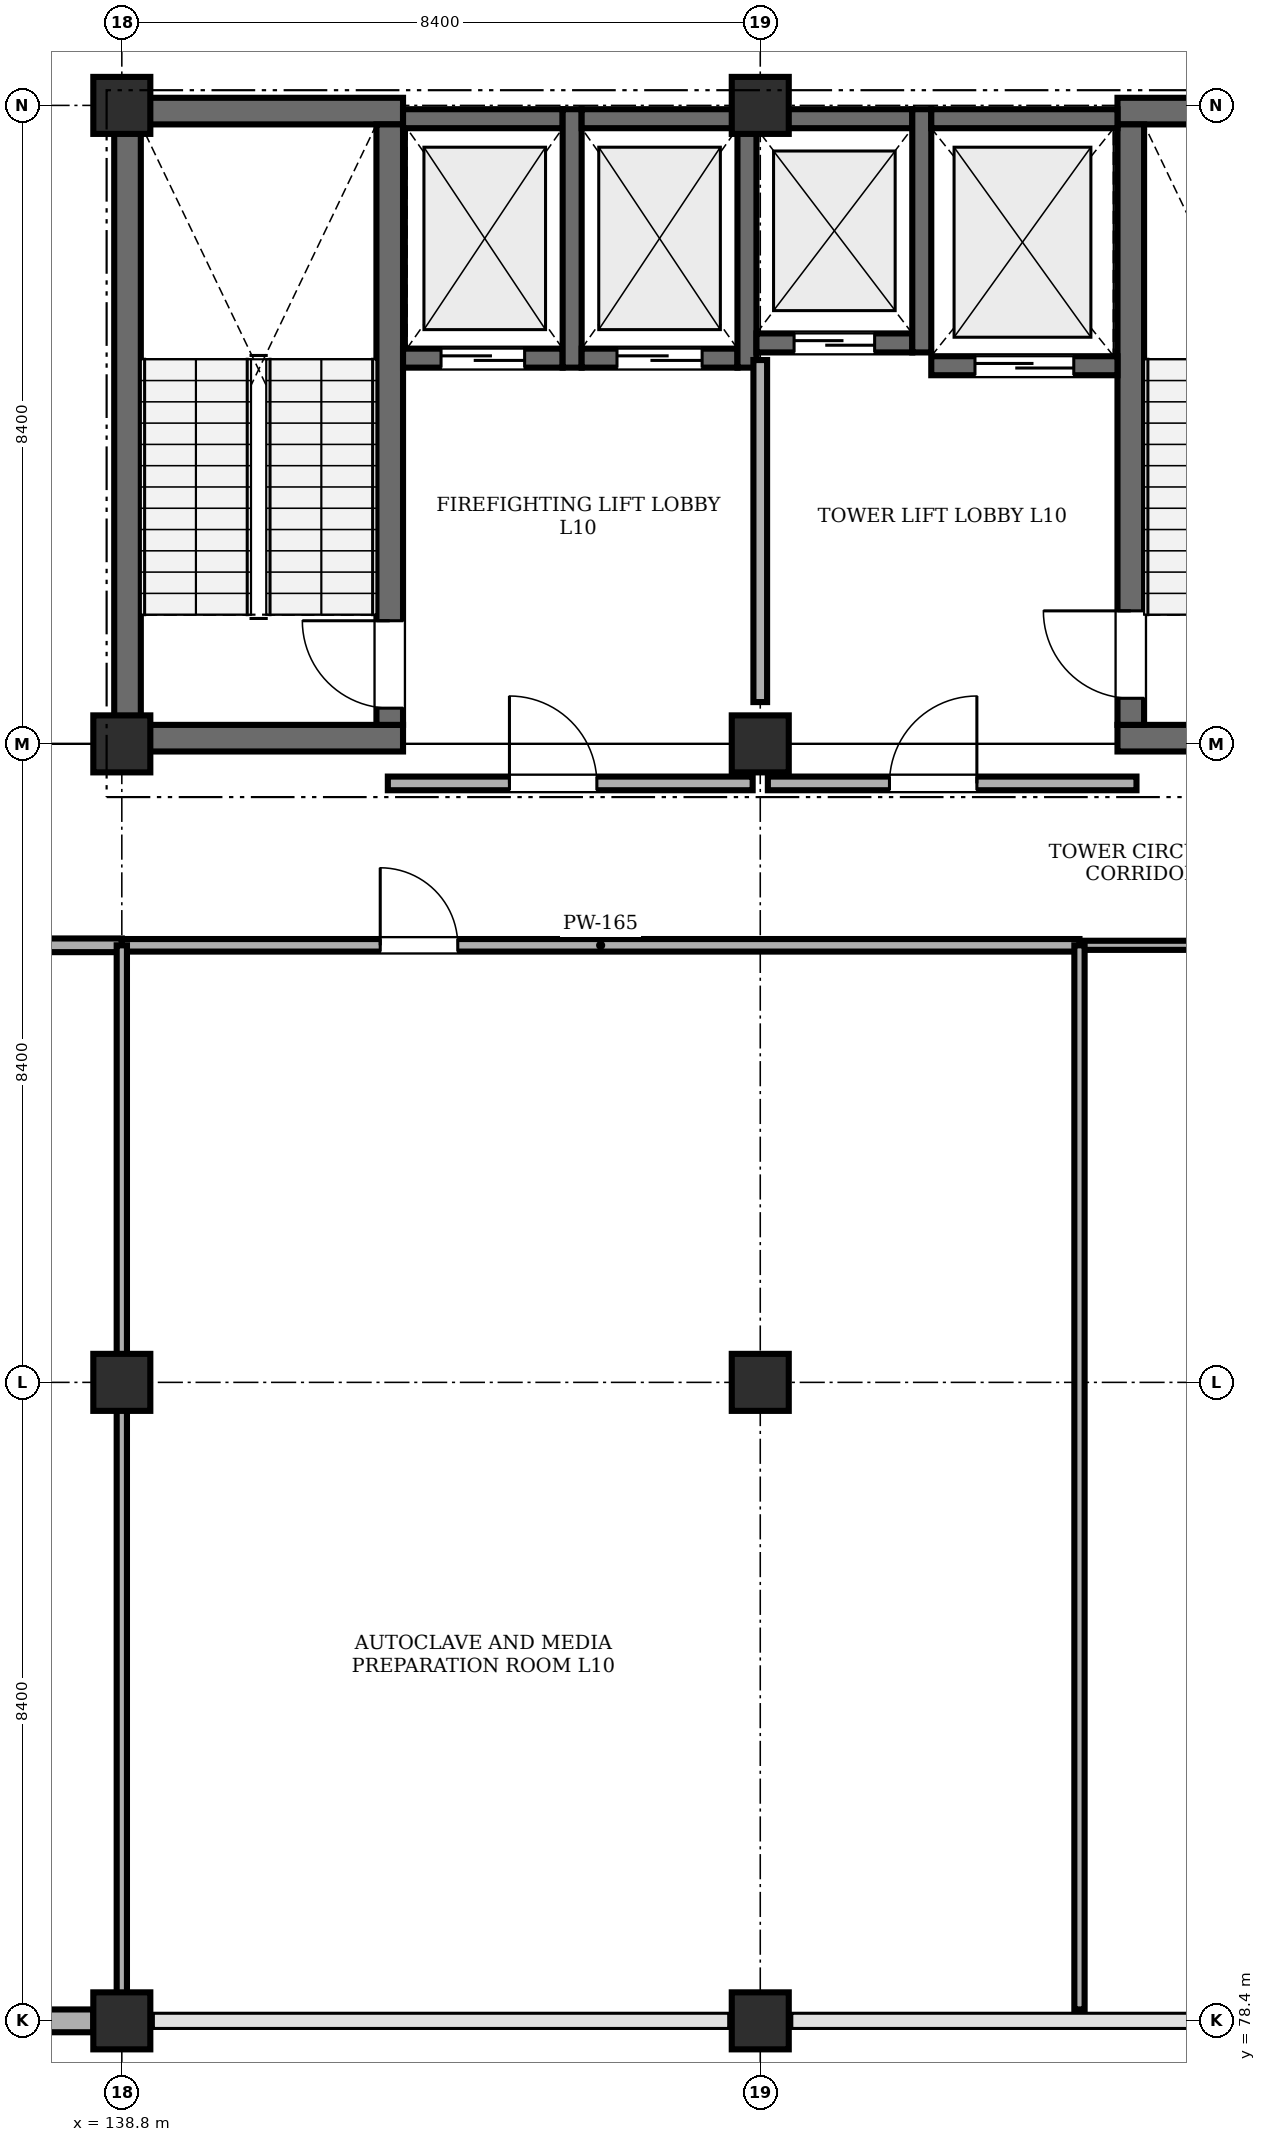
"""IFC4 building model, lengths in metres.
Left out: names, types, materials, properties, quantities, classifications, styles, units other than length and angle.
Written with IfcOpenShell. Run it as: python <this file> out.ifc"""

import sys

from ifc_helpers import new_model, si_unit, direction, frame, frame_2d, origin, origin_2d, place, context, subcontext, project, spatial, rectangle, extrude, element, fill, save


model = new_model("IFC4")
c1 = context("Model", 3, precision=1e-05, world=origin(), true_north=direction((0.0, 1.0)))
c2 = subcontext(c1, "Body", "Model", "MODEL_VIEW")
j1 = project(units=[si_unit("LENGTHUNIT", "METRE"), si_unit("PLANEANGLEUNIT", "RADIAN")], contexts=[c1])
p1 = place(None, origin())
s1 = spatial("IfcSite", under=j1, at=p1, CompositionType="ELEMENT")
p2 = place(p1, origin())
s2 = spatial("IfcBuilding", under=s1, at=p2, CompositionType="ELEMENT")
p3 = place(p2, frame((0.0, 0.0, 40.2)))
s3 = spatial("IfcBuildingStorey", under=s2, at=p3, CompositionType="ELEMENT", Elevation=40.2)
for number, where, z_axis, x_axis in (
    (1, (138.8, 78.4, 0.0), (0.0, 0.0, 1.0), (1.0, 0.0, 0.0)),
    (2, (138.8, 86.8, 0.0), (0.0, 0.0, 1.0), (1.0, 0.0, 0.0)),
    (3, (138.8, 95.2, 0.0), (0.0, 0.0, 1.0), (1.0, 0.0, 0.0)),
    (4, (138.8, 103.6, 0.0), (0.0, 0.0, 1.0), (1.0, 0.0, 0.0)),
    (5, (147.2, 78.4, 0.0), (0.0, 0.0, 1.0), (1.0, 0.0, 0.0)),
    (6, (147.2, 86.8, 0.0), (0.0, 0.0, 1.0), (1.0, 0.0, 0.0)),
    (7, (147.2, 95.2, 0.0), (0.0, 0.0, 1.0), (1.0, 0.0, 0.0)),
    (8, (147.2, 103.6, 0.0), (0.0, 0.0, 1.0), (1.0, 0.0, 0.0)),
):
    element("IfcColumn", number, at=place(p3, frame(where, z_axis=z_axis, x_axis=x_axis)), inside=s3, PredefinedType="COLUMN", context=c2, shape_type="SweptSolid", body=[
        extrude(rectangle(XDim=0.75, YDim=0.75, at=origin_2d()), origin(), (0.0, 0.0, 1.0), 4.0),
    ])
for number, where, z_axis, x_axis in (
    (9, (138.7, 95.275, 0.0), (0.0, 0.0, 1.0), (1.0, 0.0, 0.0)),
    (10, (138.7, 103.525, 0.0), (0.0, 0.0, 1.0), (1.0, 0.0, 0.0)),
):
    element("IfcWall", number, at=place(p3, frame(where, z_axis=z_axis, x_axis=x_axis)), inside=s3, PredefinedType="SHEAR", context=c2, shape_type="SweptSolid", body=[
        extrude(rectangle(XDim=3.8, YDim=0.35, at=frame_2d((1.9, 0.0))), origin(), (0.0, 0.0, 1.0), 4.0),
    ])
p4 = place(p3, frame((138.875, 95.45, 0.0), z_axis=(0.0, 0.0, 1.0), x_axis=(0.0, 1.0, 0.0)))
e11 = element("IfcWall", 11, at=p4, inside=s3, PredefinedType="SHEAR", context=c2, shape_type="SweptSolid", body=[
    extrude(rectangle(XDim=7.9, YDim=0.35, at=frame_2d((3.95, 0.0))), origin(), (0.0, 0.0, 1.0), 4.0),
])
p5 = place(p3, frame((142.325, 95.45, 0.0), z_axis=(0.0, 0.0, 1.0), x_axis=(0.0, 1.0, 0.0)))
e12 = element("IfcWall", 12, at=p5, inside=s3, PredefinedType="SHEAR", context=c2, shape_type="SweptSolid", body=[
    extrude(rectangle(XDim=7.9, YDim=0.35, at=frame_2d((3.95, 0.0))), origin(), (0.0, 0.0, 1.0), 4.0),
])
p6 = place(p5, frame((0.22, 0.0, 0.0)))
e13 = element("IfcOpeningElement", 13, at=p6, cuts=e12, PredefinedType="OPENING", context=c2, shape_type="SweptSolid", body=[
    extrude(rectangle(XDim=1.15, YDim=2.15, at=frame_2d((0.575, 1.075))), frame((0.0, 0.185, 0.0), z_axis=(0.0, -1.0, 0.0), x_axis=(1.0, 0.0, 0.0)), (0.0, 0.0, 1.0), 0.37),
])
for number, where, z_axis, x_axis in (
    (14, (151.9, 95.275, 0.0), (0.0, 0.0, 1.0), (1.0, 0.0, 0.0)),
    (15, (151.9, 103.525, 0.0), (0.0, 0.0, 1.0), (1.0, 0.0, 0.0)),
):
    element("IfcWall", number, at=place(p3, frame(where, z_axis=z_axis, x_axis=x_axis)), inside=s3, PredefinedType="SHEAR", context=c2, shape_type="SweptSolid", body=[
        extrude(rectangle(XDim=3.8, YDim=0.35, at=frame_2d((1.9, 0.0))), origin(), (0.0, 0.0, 1.0), 4.0),
    ])
p7 = place(p3, frame((152.075, 95.45, 0.0), z_axis=(0.0, 0.0, 1.0), x_axis=(0.0, 1.0, 0.0)))
e16 = element("IfcWall", 16, at=p7, inside=s3, PredefinedType="SHEAR", context=c2, shape_type="SweptSolid", body=[
    extrude(rectangle(XDim=7.9, YDim=0.35, at=frame_2d((3.95, 0.0))), origin(), (0.0, 0.0, 1.0), 4.0),
])
p8 = place(p7, frame((0.35, 0.0, 0.0)))
e17 = element("IfcOpeningElement", 17, at=p8, cuts=e16, PredefinedType="OPENING", context=c2, shape_type="SweptSolid", body=[
    extrude(rectangle(XDim=1.15, YDim=2.15, at=frame_2d((0.575, 1.075))), frame((0.0, 0.185, 0.0), z_axis=(0.0, -1.0, 0.0), x_axis=(1.0, 0.0, 0.0)), (0.0, 0.0, 1.0), 0.37),
])
p9 = place(p3, frame((142.5, 100.275, 0.0), z_axis=(0.0, 0.0, 1.0), x_axis=(1.0, 0.0, 0.0)))
e18 = element("IfcWall", 18, at=p9, inside=s3, PredefinedType="SHEAR", context=c2, shape_type="SweptSolid", body=[
    extrude(rectangle(XDim=2.1, YDim=0.25, at=frame_2d((1.05, 0.0))), origin(), (0.0, 0.0, 1.0), 4.0),
])
p10 = place(p9, frame((0.5, 0.0, 0.0)))
e19 = element("IfcOpeningElement", 19, at=p10, cuts=e18, PredefinedType="OPENING", context=c2, shape_type="SweptSolid", body=[
    extrude(rectangle(XDim=1.1, YDim=2.15, at=frame_2d((0.55, 1.075))), frame((0.0, 0.135, 0.0), z_axis=(0.0, -1.0, 0.0), x_axis=(1.0, 0.0, 0.0)), (0.0, 0.0, 1.0), 0.27),
])
p11 = place(p3, frame((142.5, 103.425, 0.0), z_axis=(0.0, 0.0, 1.0), x_axis=(1.0, 0.0, 0.0)))
e20 = element("IfcWall", 20, at=p11, inside=s3, PredefinedType="SHEAR", context=c2, shape_type="SweptSolid", body=[
    extrude(rectangle(XDim=2.1, YDim=0.25, at=frame_2d((1.05, 0.0))), origin(), (0.0, 0.0, 1.0), 4.0),
])
p12 = place(p3, frame((144.725, 100.15, 0.0), z_axis=(0.0, 0.0, 1.0), x_axis=(0.0, 1.0, 0.0)))
e21 = element("IfcWall", 21, at=p12, inside=s3, PredefinedType="SHEAR", context=c2, shape_type="SweptSolid", body=[
    extrude(rectangle(XDim=3.4, YDim=0.25, at=frame_2d((1.7, 0.0))), origin(), (0.0, 0.0, 1.0), 4.0),
])
p13 = place(p3, frame((144.85, 100.275, 0.0), z_axis=(0.0, 0.0, 1.0), x_axis=(1.0, 0.0, 0.0)))
e22 = element("IfcWall", 22, at=p13, inside=s3, PredefinedType="SHEAR", context=c2, shape_type="SweptSolid", body=[
    extrude(rectangle(XDim=2.05, YDim=0.25, at=frame_2d((1.025, 0.0))), origin(), (0.0, 0.0, 1.0), 4.0),
])
p14 = place(p13, frame((0.465, 0.0, 0.0)))
e23 = element("IfcOpeningElement", 23, at=p14, cuts=e22, PredefinedType="OPENING", context=c2, shape_type="SweptSolid", body=[
    extrude(rectangle(XDim=1.12, YDim=2.15, at=frame_2d((0.56, 1.075))), frame((0.0, 0.135, 0.0), z_axis=(0.0, -1.0, 0.0), x_axis=(1.0, 0.0, 0.0)), (0.0, 0.0, 1.0), 0.27),
])
p15 = place(p3, frame((144.85, 103.425, 0.0), z_axis=(0.0, 0.0, 1.0), x_axis=(1.0, 0.0, 0.0)))
e24 = element("IfcWall", 24, at=p15, inside=s3, PredefinedType="SHEAR", context=c2, shape_type="SweptSolid", body=[
    extrude(rectangle(XDim=2.05, YDim=0.25, at=frame_2d((1.025, 0.0))), origin(), (0.0, 0.0, 1.0), 4.0),
])
p16 = place(p3, frame((147.025, 100.15, 0.0), z_axis=(0.0, 0.0, 1.0), x_axis=(0.0, 1.0, 0.0)))
e25 = element("IfcWall", 25, at=p16, inside=s3, PredefinedType="SHEAR", context=c2, shape_type="SweptSolid", body=[
    extrude(rectangle(XDim=3.4, YDim=0.25, at=frame_2d((1.7, 0.0))), origin(), (0.0, 0.0, 1.0), 4.0),
])
p17 = place(p3, frame((147.15, 100.475, 0.0), z_axis=(0.0, 0.0, 1.0), x_axis=(1.0, 0.0, 0.0)))
e26 = element("IfcWall", 26, at=p17, inside=s3, PredefinedType="SHEAR", context=c2, shape_type="SweptSolid", body=[
    extrude(rectangle(XDim=2.05, YDim=0.25, at=frame_2d((1.025, 0.0))), origin(), (0.0, 0.0, 1.0), 4.0),
])
p18 = place(p17, frame((0.495, 0.0, 0.0)))
e27 = element("IfcOpeningElement", 27, at=p18, cuts=e26, PredefinedType="OPENING", context=c2, shape_type="SweptSolid", body=[
    extrude(rectangle(XDim=1.06, YDim=2.15, at=frame_2d((0.53, 1.075))), frame((0.0, 0.135, 0.0), z_axis=(0.0, -1.0, 0.0), x_axis=(1.0, 0.0, 0.0)), (0.0, 0.0, 1.0), 0.27),
])
p19 = place(p3, frame((147.15, 103.425, 0.0), z_axis=(0.0, 0.0, 1.0), x_axis=(1.0, 0.0, 0.0)))
e28 = element("IfcWall", 28, at=p19, inside=s3, PredefinedType="SHEAR", context=c2, shape_type="SweptSolid", body=[
    extrude(rectangle(XDim=2.05, YDim=0.25, at=frame_2d((1.025, 0.0))), origin(), (0.0, 0.0, 1.0), 4.0),
])
p20 = place(p3, frame((149.325, 100.35, 0.0), z_axis=(0.0, 0.0, 1.0), x_axis=(0.0, 1.0, 0.0)))
e29 = element("IfcWall", 29, at=p20, inside=s3, PredefinedType="SHEAR", context=c2, shape_type="SweptSolid", body=[
    extrude(rectangle(XDim=3.2, YDim=0.25, at=frame_2d((1.6, 0.0))), origin(), (0.0, 0.0, 1.0), 4.0),
])
p21 = place(p3, frame((149.45, 100.175, 0.0), z_axis=(0.0, 0.0, 1.0), x_axis=(1.0, 0.0, 0.0)))
e30 = element("IfcWall", 30, at=p21, inside=s3, PredefinedType="SHEAR", context=c2, shape_type="SweptSolid", body=[
    extrude(rectangle(XDim=2.45, YDim=0.25, at=frame_2d((1.225, 0.0))), origin(), (0.0, 0.0, 1.0), 4.0),
])
p22 = place(p21, frame((0.575, 0.0, 0.0)))
e31 = element("IfcOpeningElement", 31, at=p22, cuts=e30, PredefinedType="OPENING", context=c2, shape_type="SweptSolid", body=[
    extrude(rectangle(XDim=1.3, YDim=2.25, at=frame_2d((0.65, 1.125))), frame((0.0, 0.135, 0.0), z_axis=(0.0, -1.0, 0.0), x_axis=(1.0, 0.0, 0.0)), (0.0, 0.0, 1.0), 0.27),
])
p23 = place(p3, frame((149.45, 103.425, 0.0), z_axis=(0.0, 0.0, 1.0), x_axis=(1.0, 0.0, 0.0)))
e32 = element("IfcWall", 32, at=p23, inside=s3, PredefinedType="SHEAR", context=c2, shape_type="SweptSolid", body=[
    extrude(rectangle(XDim=2.45, YDim=0.25, at=frame_2d((1.225, 0.0))), origin(), (0.0, 0.0, 1.0), 4.0),
])
p24 = place(p3, frame((138.425, 78.4, 0.0), z_axis=(0.0, 0.0, 1.0), x_axis=(-1.0, 0.0, 0.0)))
e33 = element("IfcWall", 33, at=p24, inside=s3, PredefinedType="STANDARD", context=c2, shape_type="SweptSolid", body=[
    extrude(rectangle(XDim=7.65, YDim=0.3, at=frame_2d((3.825, 0.0))), origin(), (0.0, 0.0, 1.0), 4.0),
])
p25 = place(p24, frame((1.15, 0.0, 0.95)))
e34 = element("IfcOpeningElement", 34, at=p25, cuts=e33, PredefinedType="OPENING", context=c2, shape_type="SweptSolid", body=[
    extrude(rectangle(XDim=2.25, YDim=1.95, at=frame_2d((1.125, 0.975))), frame((0.0, 0.16, 0.0), z_axis=(0.0, -1.0, 0.0), x_axis=(1.0, 0.0, 0.0)), (0.0, 0.0, 1.0), 0.32),
])
p26 = place(p3, frame((142.3, 94.68, 0.0), z_axis=(0.0, 0.0, 1.0), x_axis=(1.0, 0.0, 0.0)))
e35 = element("IfcWall", 35, at=p26, inside=s3, PredefinedType="STANDARD", context=c2, shape_type="SweptSolid", body=[
    extrude(rectangle(XDim=4.8, YDim=0.18, at=frame_2d((2.4, 0.0))), origin(), (0.0, 0.0, 1.0), 4.0),
])
p27 = place(p26, frame((1.6, 0.0, 0.0)))
e36 = element("IfcOpeningElement", 36, at=p27, cuts=e35, PredefinedType="OPENING", context=c2, shape_type="SweptSolid", body=[
    extrude(rectangle(XDim=1.15, YDim=2.15, at=frame_2d((0.575, 1.075))), frame((0.0, 0.1, 0.0), z_axis=(0.0, -1.0, 0.0), x_axis=(1.0, 0.0, 0.0)), (0.0, 0.0, 1.0), 0.2),
])
p28 = place(p3, frame((147.3, 94.68, 0.0), z_axis=(0.0, 0.0, 1.0), x_axis=(1.0, 0.0, 0.0)))
e37 = element("IfcWall", 37, at=p28, inside=s3, PredefinedType="STANDARD", context=c2, shape_type="SweptSolid", body=[
    extrude(rectangle(XDim=4.85, YDim=0.18, at=frame_2d((2.425, 0.0))), origin(), (0.0, 0.0, 1.0), 4.0),
])
p29 = place(p28, frame((1.6, 0.0, 0.0)))
e38 = element("IfcOpeningElement", 38, at=p29, cuts=e37, PredefinedType="OPENING", context=c2, shape_type="SweptSolid", body=[
    extrude(rectangle(XDim=1.15, YDim=2.15, at=frame_2d((0.575, 1.075))), frame((0.0, 0.1, 0.0), z_axis=(0.0, -1.0, 0.0), x_axis=(1.0, 0.0, 0.0)), (0.0, 0.0, 1.0), 0.2),
])
p30 = place(p3, frame((147.2, 95.75, 0.0), z_axis=(0.0, 0.0, 1.0), x_axis=(0.0, 1.0, 0.0)))
e39 = element("IfcWall", 39, at=p30, inside=s3, PredefinedType="STANDARD", context=c2, shape_type="SweptSolid", body=[
    extrude(rectangle(XDim=4.5, YDim=0.18, at=frame_2d((2.25, 0.0))), origin(), (0.0, 0.0, 1.0), 3.3),
])
p31 = place(p3, frame((130.55, 92.55, 0.0), z_axis=(0.0, 0.0, 1.0), x_axis=(1.0, 0.0, 0.0)))
e40 = element("IfcWall", 40, at=p31, inside=s3, PredefinedType="STANDARD", context=c2, shape_type="SweptSolid", body=[
    extrude(rectangle(XDim=8.25, YDim=0.18, at=frame_2d((4.125, 0.0))), origin(), (0.0, 0.0, 1.0), 4.0),
])
p32 = place(p31, frame((3.65, 0.0, 0.0)))
e41 = element("IfcOpeningElement", 41, at=p32, cuts=e40, PredefinedType="OPENING", context=c2, shape_type="SweptSolid", body=[
    extrude(rectangle(XDim=1.05, YDim=2.15, at=frame_2d((0.525, 1.075))), frame((0.0, 0.1, 0.0), z_axis=(0.0, -1.0, 0.0), x_axis=(1.0, 0.0, 0.0)), (0.0, 0.0, 1.0), 0.2),
])
p33 = place(p3, frame((138.8, 92.55, 0.0), z_axis=(0.0, 0.0, 1.0), x_axis=(1.0, 0.0, 0.0)))
e42 = element("IfcWall", 42, at=p33, inside=s3, PredefinedType="PARTITIONING", context=c2, shape_type="SweptSolid", body=[
    extrude(rectangle(XDim=12.6, YDim=0.165, at=frame_2d((6.3, 0.0))), origin(), (0.0, 0.0, 1.0), 4.0),
])
p34 = place(p33, frame((3.4, 0.0, 0.0)))
e43 = element("IfcOpeningElement", 43, at=p34, cuts=e42, PredefinedType="OPENING", context=c2, shape_type="SweptSolid", body=[
    extrude(rectangle(XDim=1.02, YDim=2.15, at=frame_2d((0.51, 1.075))), frame((0.0, 0.093, 0.0), z_axis=(0.0, -1.0, 0.0), x_axis=(1.0, 0.0, 0.0)), (0.0, 0.0, 1.0), 0.185),
])
p35 = place(p3, frame((138.8, 78.55, 0.0), z_axis=(0.0, 0.0, 1.0), x_axis=(0.0, 1.0, 0.0)))
e44 = element("IfcWall", 44, at=p35, inside=s3, PredefinedType="PARTITIONING", context=c2, shape_type="SweptSolid", body=[
    extrude(rectangle(XDim=14.0, YDim=0.135, at=frame_2d((7.0, 0.0))), origin(), (0.0, 0.0, 1.0), 3.3),
])
p36 = place(p3, frame((151.4, 92.55, 0.0), z_axis=(0.0, 0.0, 1.0), x_axis=(1.0, 0.0, 0.0)))
e45 = element("IfcWall", 45, at=p36, inside=s3, PredefinedType="PARTITIONING", context=c2, shape_type="SweptSolid", body=[
    extrude(rectangle(XDim=11.95, YDim=0.12, at=frame_2d((5.975, 0.0))), origin(), (0.0, 0.0, 1.0), 4.0),
])
p37 = place(p36, frame((6.8, 0.0, 0.0)))
e46 = element("IfcOpeningElement", 46, at=p37, cuts=e45, PredefinedType="OPENING", context=c2, shape_type="SweptSolid", body=[
    extrude(rectangle(XDim=1.1, YDim=2.18, at=frame_2d((0.55, 1.09))), frame((0.0, 0.07, 0.0), z_axis=(0.0, -1.0, 0.0), x_axis=(1.0, 0.0, 0.0)), (0.0, 0.0, 1.0), 0.14),
])
p38 = place(p3, frame((151.4, 78.55, 0.0), z_axis=(0.0, 0.0, 1.0), x_axis=(0.0, 1.0, 0.0)))
e47 = element("IfcWall", 47, at=p38, inside=s3, PredefinedType="PARTITIONING", context=c2, shape_type="SweptSolid", body=[
    extrude(rectangle(XDim=14.0, YDim=0.135, at=frame_2d((7.0, 0.0))), origin(), (0.0, 0.0, 1.0), 3.55),
])
p39 = place(p27, origin())
e48 = element("IfcDoor", 48, at=p39, inside=s3, OperationType="SINGLE_SWING_LEFT", PredefinedType="DOOR", context=c2, shape_type="SweptSolid", body=[
    extrude(rectangle(XDim=1.15, YDim=2.15, at=frame_2d((0.575, 1.075))), frame((0.0, 0.025, 0.0), z_axis=(0.0, -1.0, 0.0), x_axis=(1.0, 0.0, 0.0)), (0.0, 0.0, 1.0), 0.05),
])
fill(e36, e48)
p40 = place(p29, origin())
e49 = element("IfcDoor", 49, at=p40, inside=s3, OperationType="SINGLE_SWING_RIGHT", PredefinedType="DOOR", context=c2, shape_type="SweptSolid", body=[
    extrude(rectangle(XDim=1.15, YDim=2.15, at=frame_2d((0.575, 1.075))), frame((0.0, 0.025, 0.0), z_axis=(0.0, -1.0, 0.0), x_axis=(1.0, 0.0, 0.0)), (0.0, 0.0, 1.0), 0.05),
])
fill(e38, e49)
p41 = place(p34, origin())
e50 = element("IfcDoor", 50, at=p41, inside=s3, OperationType="SINGLE_SWING_LEFT", PredefinedType="DOOR", context=c2, shape_type="SweptSolid", body=[
    extrude(rectangle(XDim=1.02, YDim=2.15, at=frame_2d((0.51, 1.075))), frame((0.0, 0.025, 0.0), z_axis=(0.0, -1.0, 0.0), x_axis=(1.0, 0.0, 0.0)), (0.0, 0.0, 1.0), 0.05),
])
fill(e43, e50)
p42 = place(p6, origin())
e51 = element("IfcDoor", 51, at=p42, inside=s3, OperationType="SINGLE_SWING_RIGHT", PredefinedType="DOOR", context=c2, shape_type="SweptSolid", body=[
    extrude(rectangle(XDim=1.15, YDim=2.15, at=frame_2d((0.575, 1.075))), frame((0.0, 0.025, 0.0), z_axis=(0.0, -1.0, 0.0), x_axis=(1.0, 0.0, 0.0)), (0.0, 0.0, 1.0), 0.05),
])
fill(e13, e51)
p43 = place(p8, origin())
e52 = element("IfcDoor", 52, at=p43, inside=s3, OperationType="SINGLE_SWING_RIGHT", PredefinedType="DOOR", context=c2, shape_type="SweptSolid", body=[
    extrude(rectangle(XDim=1.15, YDim=2.15, at=frame_2d((0.575, 1.075))), frame((0.0, 0.025, 0.0), z_axis=(0.0, -1.0, 0.0), x_axis=(1.0, 0.0, 0.0)), (0.0, 0.0, 1.0), 0.05),
])
fill(e17, e52)
p44 = place(p10, origin())
e53 = element("IfcDoor", 53, at=p44, inside=s3, OperationType="SLIDING_TO_LEFT", PredefinedType="DOOR", context=c2, shape_type="SweptSolid", body=[
    extrude(rectangle(XDim=1.1, YDim=2.15, at=frame_2d((0.55, 1.075))), frame((0.0, 0.025, 0.0), z_axis=(0.0, -1.0, 0.0), x_axis=(1.0, 0.0, 0.0)), (0.0, 0.0, 1.0), 0.05),
])
fill(e19, e53)
p45 = place(p14, origin())
e54 = element("IfcDoor", 54, at=p45, inside=s3, OperationType="SLIDING_TO_LEFT", PredefinedType="DOOR", context=c2, shape_type="SweptSolid", body=[
    extrude(rectangle(XDim=1.12, YDim=2.15, at=frame_2d((0.56, 1.075))), frame((0.0, 0.025, 0.0), z_axis=(0.0, -1.0, 0.0), x_axis=(1.0, 0.0, 0.0)), (0.0, 0.0, 1.0), 0.05),
])
fill(e23, e54)
p46 = place(p18, origin())
e55 = element("IfcDoor", 55, at=p46, inside=s3, OperationType="SLIDING_TO_LEFT", PredefinedType="DOOR", context=c2, shape_type="SweptSolid", body=[
    extrude(rectangle(XDim=1.06, YDim=2.15, at=frame_2d((0.53, 1.075))), frame((0.0, 0.025, 0.0), z_axis=(0.0, -1.0, 0.0), x_axis=(1.0, 0.0, 0.0)), (0.0, 0.0, 1.0), 0.05),
])
fill(e27, e55)
p47 = place(p22, origin())
e56 = element("IfcDoor", 56, at=p47, inside=s3, OperationType="SLIDING_TO_LEFT", PredefinedType="DOOR", context=c2, shape_type="SweptSolid", body=[
    extrude(rectangle(XDim=1.3, YDim=2.25, at=frame_2d((0.65, 1.125))), frame((0.0, 0.025, 0.0), z_axis=(0.0, -1.0, 0.0), x_axis=(1.0, 0.0, 0.0)), (0.0, 0.0, 1.0), 0.05),
])
fill(e31, e56)
save(model, sys.argv[1])
